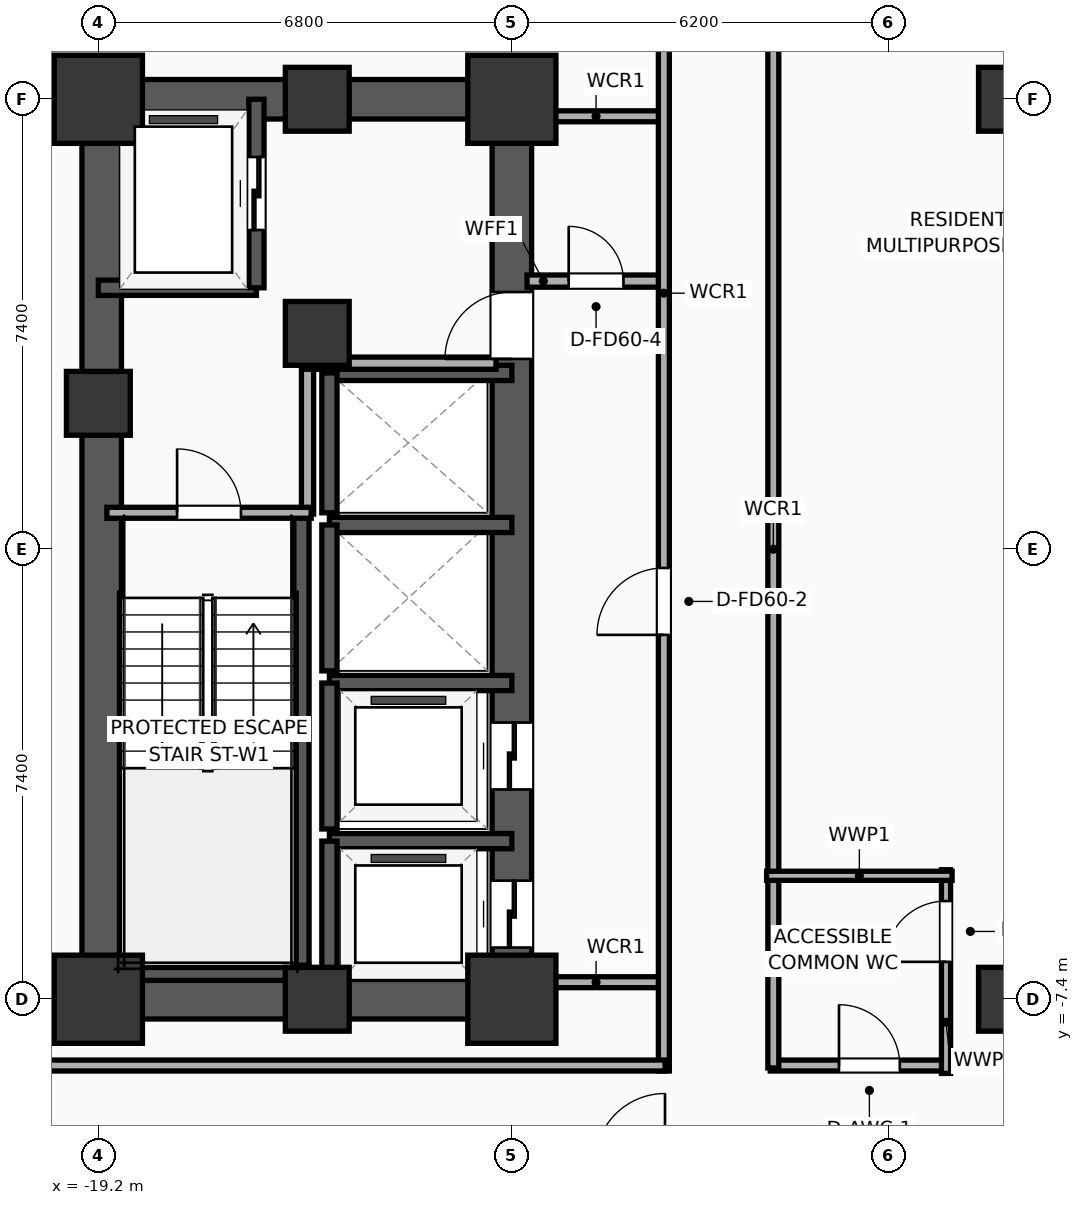
"""IFC4 building model, lengths in metres.
Left out: names, types, materials, properties, quantities, classifications, styles, units other than length and angle.
Written with IfcOpenShell. Run it as: python <this file> out.ifc"""

import sys

from ifc_helpers import new_model, si_unit, direction, frame, frame_2d, origin, origin_2d, place, context, subcontext, project, spatial, rectangle, extrude, element, fill, save


model = new_model("IFC4")
c1 = context("Model", 3, precision=1e-05, world=origin(), true_north=direction((0.0, 1.0)))
c2 = subcontext(c1, "Body", "Model", "MODEL_VIEW")
j1 = project(units=[si_unit("LENGTHUNIT", "METRE"), si_unit("PLANEANGLEUNIT", "RADIAN")], contexts=[c1])
p1 = place(None, origin())
s1 = spatial("IfcSite", under=j1, at=p1, CompositionType="ELEMENT")
p2 = place(p1, origin())
s2 = spatial("IfcBuilding", under=s1, at=p2, CompositionType="ELEMENT")
p3 = place(p2, frame((0.0, 0.0, 45.5)))
s3 = spatial("IfcBuildingStorey", under=s2, at=p3, CompositionType="ELEMENT", Elevation=45.5)
p4 = place(p3, frame((-19.2, -7.4, 0.0), z_axis=(0.0, 0.0, 1.0), x_axis=(1.0, 0.0, 0.0)))
e1 = element("IfcColumn", 1, at=p4, inside=s3, PredefinedType="COLUMN", context=c2, shape_type="SweptSolid", body=[
    extrude(rectangle(XDim=1.45, YDim=1.45, at=origin_2d()), origin(), (0.0, 0.0, 1.0), 3.9),
])
p5 = place(p3, frame((-19.2, 2.4, 0.0), z_axis=(0.0, 0.0, 1.0), x_axis=(1.0, 0.0, 0.0)))
e2 = element("IfcColumn", 2, at=p5, inside=s3, PredefinedType="COLUMN", context=c2, shape_type="SweptSolid", body=[
    extrude(rectangle(XDim=1.05, YDim=1.05, at=origin_2d()), origin(), (0.0, 0.0, 1.0), 3.9),
])
p6 = place(p3, frame((-19.2, 7.4, 0.0), z_axis=(0.0, 0.0, 1.0), x_axis=(1.0, 0.0, 0.0)))
e3 = element("IfcColumn", 3, at=p6, inside=s3, PredefinedType="COLUMN", context=c2, shape_type="SweptSolid", body=[
    extrude(rectangle(XDim=1.45, YDim=1.45, at=origin_2d()), origin(), (0.0, 0.0, 1.0), 3.9),
])
for number, where, z_axis, x_axis in (
    (4, (-15.6, -7.4, 0.0), (0.0, 0.0, 1.0), (1.0, 0.0, 0.0)),
    (5, (-15.6, 7.4, 0.0), (0.0, 0.0, 1.0), (1.0, 0.0, 0.0)),
):
    element("IfcColumn", number, at=place(p3, frame(where, z_axis=z_axis, x_axis=x_axis)), inside=s3, PredefinedType="COLUMN", context=c2, shape_type="SweptSolid", body=[
        extrude(rectangle(XDim=1.05, YDim=1.05, at=origin_2d()), origin(), (0.0, 0.0, 1.0), 3.9),
    ])
p7 = place(p3, frame((-12.4, -7.4, 0.0), z_axis=(0.0, 0.0, 1.0), x_axis=(1.0, 0.0, 0.0)))
e6 = element("IfcColumn", 6, at=p7, inside=s3, PredefinedType="COLUMN", context=c2, shape_type="SweptSolid", body=[
    extrude(rectangle(XDim=1.45, YDim=1.45, at=origin_2d()), origin(), (0.0, 0.0, 1.0), 3.9),
])
p8 = place(p3, frame((-15.6, 3.55, 0.0), z_axis=(0.0, 0.0, 1.0), x_axis=(1.0, 0.0, 0.0)))
e7 = element("IfcColumn", 7, at=p8, inside=s3, PredefinedType="COLUMN", context=c2, shape_type="SweptSolid", body=[
    extrude(rectangle(XDim=1.05, YDim=1.05, at=origin_2d()), origin(), (0.0, 0.0, 1.0), 3.9),
])
p9 = place(p3, frame((-12.4, 7.4, 0.0), z_axis=(0.0, 0.0, 1.0), x_axis=(1.0, 0.0, 0.0)))
e8 = element("IfcColumn", 8, at=p9, inside=s3, PredefinedType="COLUMN", context=c2, shape_type="SweptSolid", body=[
    extrude(rectangle(XDim=1.45, YDim=1.45, at=origin_2d()), origin(), (0.0, 0.0, 1.0), 3.9),
])
for number, where, z_axis, x_axis in (
    (9, (-19.525, -7.4, 0.0), (0.0, 0.0, 1.0), (1.0, 0.0, 0.0)),
    (10, (-19.525, 7.4, 0.0), (0.0, 0.0, 1.0), (1.0, 0.0, 0.0)),
):
    element("IfcWall", number, at=place(p3, frame(where, z_axis=z_axis, x_axis=x_axis)), inside=s3, PredefinedType="SHEAR", context=c2, shape_type="SweptSolid", body=[
        extrude(rectangle(XDim=7.45, YDim=0.65, at=frame_2d((3.725, 0.0))), origin(), (0.0, 0.0, 1.0), 3.65),
    ])
p10 = place(p3, frame((-19.145, -7.4, 0.0), z_axis=(0.0, 0.0, 1.0), x_axis=(0.0, 1.0, 0.0)))
e11 = element("IfcWall", 11, at=p10, inside=s3, PredefinedType="SHEAR", context=c2, shape_type="SweptSolid", body=[
    extrude(rectangle(XDim=14.8, YDim=0.65, at=frame_2d((7.4, 0.0))), origin(), (0.0, 0.0, 1.0), 3.65),
])
p11 = place(p3, frame((-12.4, -7.4, 0.0), z_axis=(0.0, 0.0, 1.0), x_axis=(0.0, 1.0, 0.0)))
e12 = element("IfcWall", 12, at=p11, inside=s3, PredefinedType="SHEAR", context=c2, shape_type="SweptSolid", body=[
    extrude(rectangle(XDim=14.8, YDim=0.65, at=frame_2d((7.4, 0.0))), origin(), (0.0, 0.0, 1.0), 3.65),
])
p12 = place(p11, frame((0.85, 0.0, 0.0)))
e13 = element("IfcOpeningElement", 13, at=p12, cuts=e12, PredefinedType="OPENING", context=c2, shape_type="SweptSolid", body=[
    extrude(rectangle(XDim=1.1, YDim=2.05, at=frame_2d((0.55, 1.025))), frame((0.0, 0.335, 0.0), z_axis=(0.0, -1.0, 0.0), x_axis=(1.0, 0.0, 0.0)), (0.0, 0.0, 1.0), 0.67),
])
p13 = place(p11, frame((3.45, 0.0, 0.0)))
e14 = element("IfcOpeningElement", 14, at=p13, cuts=e12, PredefinedType="OPENING", context=c2, shape_type="SweptSolid", body=[
    extrude(rectangle(XDim=1.1, YDim=2.05, at=frame_2d((0.55, 1.025))), frame((0.0, 0.335, 0.0), z_axis=(0.0, -1.0, 0.0), x_axis=(1.0, 0.0, 0.0)), (0.0, 0.0, 1.0), 0.67),
])
p14 = place(p11, frame((10.53, 0.0, 0.0)))
e15 = element("IfcOpeningElement", 15, at=p14, cuts=e12, PredefinedType="OPENING", context=c2, shape_type="SweptSolid", body=[
    extrude(rectangle(XDim=1.1, YDim=2.05, at=frame_2d((0.55, 1.025))), frame((0.0, 0.335, 0.0), z_axis=(0.0, -1.0, 0.0), x_axis=(1.0, 0.0, 0.0)), (0.0, 0.0, 1.0), 0.67),
])
p15 = place(p3, frame((-15.86, -7.085, 0.0), z_axis=(0.0, 0.0, 1.0), x_axis=(0.0, 1.0, 0.0)))
e16 = element("IfcWall", 16, at=p15, inside=s3, PredefinedType="SOLIDWALL", context=c2, shape_type="SweptSolid", body=[
    extrude(rectangle(XDim=7.685, YDim=0.25, at=frame_2d((3.843, 0.0))), origin(), (0.0, 0.0, 1.0), 3.65),
])
p16 = place(p3, frame((-19.2, -6.965, 0.0), z_axis=(0.0, 0.0, 1.0), x_axis=(1.0, 0.0, 0.0)))
e17 = element("IfcWall", 17, at=p16, inside=s3, PredefinedType="SOLIDWALL", context=c2, shape_type="SweptSolid", body=[
    extrude(rectangle(XDim=3.46, YDim=0.25, at=frame_2d((1.73, 0.0))), origin(), (0.0, 0.0, 1.0), 3.65),
])
for number, where, z_axis, x_axis in (
    (18, (-4.2, -7.4, 0.0), (0.0, 0.0, 1.0), (1.0, 0.0, 0.0)),
    (19, (-4.2, 7.4, 0.0), (0.0, 0.0, 1.0), (1.0, 0.0, 0.0)),
):
    element("IfcColumn", number, at=place(p3, frame(where, z_axis=z_axis, x_axis=x_axis)), inside=s3, PredefinedType="COLUMN", context=c2, shape_type="SweptSolid", body=[
        extrude(rectangle(XDim=1.05, YDim=1.05, at=origin_2d()), origin(), (0.0, 0.0, 1.0), 3.9),
    ])
p17 = place(p3, frame((-19.2, 4.3, 0.0), z_axis=(0.0, 0.0, 1.0), x_axis=(1.0, 0.0, 0.0)))
e20 = element("IfcWall", 20, at=p17, inside=s3, PredefinedType="SOLIDWALL", context=c2, shape_type="SweptSolid", body=[
    extrude(rectangle(XDim=2.6, YDim=0.25, at=frame_2d((1.3, 0.0))), origin(), (0.0, 0.0, 1.0), 3.65),
])
p18 = place(p3, frame((-16.6, 4.3, 0.0), z_axis=(0.0, 0.0, 1.0), x_axis=(0.0, 1.0, 0.0)))
e21 = element("IfcWall", 21, at=p18, inside=s3, PredefinedType="SOLIDWALL", context=c2, shape_type="SweptSolid", body=[
    extrude(rectangle(XDim=3.1, YDim=0.25, at=frame_2d((1.55, 0.0))), origin(), (0.0, 0.0, 1.0), 3.65),
])
p19 = place(p18, frame((0.95, 0.0, 0.0)))
e22 = element("IfcOpeningElement", 22, at=p19, cuts=e21, PredefinedType="OPENING", context=c2, shape_type="SweptSolid", body=[
    extrude(rectangle(XDim=1.2, YDim=2.05, at=frame_2d((0.6, 1.025))), frame((0.0, 0.135, 0.0), z_axis=(0.0, -1.0, 0.0), x_axis=(1.0, 0.0, 0.0)), (0.0, 0.0, 1.0), 0.27),
])
p20 = place(p3, frame((-12.4, -4.8, 0.0), z_axis=(0.0, 0.0, 1.0), x_axis=(-1.0, 0.0, 0.0)))
e23 = element("IfcWall", 23, at=p20, inside=s3, PredefinedType="SOLIDWALL", context=c2, shape_type="SweptSolid", body=[
    extrude(rectangle(XDim=3.0, YDim=0.25, at=frame_2d((1.5, 0.0))), origin(), (0.0, 0.0, 1.0), 3.65),
])
p21 = place(p3, frame((-15.4, -4.8, 0.0), z_axis=(0.0, 0.0, 1.0), x_axis=(0.0, -1.0, 0.0)))
e24 = element("IfcWall", 24, at=p21, inside=s3, PredefinedType="SOLIDWALL", context=c2, shape_type="SweptSolid", body=[
    extrude(rectangle(XDim=2.6, YDim=0.25, at=frame_2d((1.3, 0.0))), origin(), (0.0, 0.0, 1.0), 3.65),
])
p22 = place(p3, frame((-12.4, -2.2, 0.0), z_axis=(0.0, 0.0, 1.0), x_axis=(-1.0, 0.0, 0.0)))
e25 = element("IfcWall", 25, at=p22, inside=s3, PredefinedType="SOLIDWALL", context=c2, shape_type="SweptSolid", body=[
    extrude(rectangle(XDim=3.0, YDim=0.25, at=frame_2d((1.5, 0.0))), origin(), (0.0, 0.0, 1.0), 3.65),
])
p23 = place(p3, frame((-15.4, -2.2, 0.0), z_axis=(0.0, 0.0, 1.0), x_axis=(0.0, -1.0, 0.0)))
e26 = element("IfcWall", 26, at=p23, inside=s3, PredefinedType="SOLIDWALL", context=c2, shape_type="SweptSolid", body=[
    extrude(rectangle(XDim=2.4, YDim=0.25, at=frame_2d((1.2, 0.0))), origin(), (0.0, 0.0, 1.0), 3.65),
])
p24 = place(p3, frame((-12.4, 0.4, 0.0), z_axis=(0.0, 0.0, 1.0), x_axis=(-1.0, 0.0, 0.0)))
e27 = element("IfcWall", 27, at=p24, inside=s3, PredefinedType="SOLIDWALL", context=c2, shape_type="SweptSolid", body=[
    extrude(rectangle(XDim=3.0, YDim=0.25, at=frame_2d((1.5, 0.0))), origin(), (0.0, 0.0, 1.0), 3.65),
])
p25 = place(p3, frame((-15.4, 0.4, 0.0), z_axis=(0.0, 0.0, 1.0), x_axis=(0.0, -1.0, 0.0)))
e28 = element("IfcWall", 28, at=p25, inside=s3, PredefinedType="SOLIDWALL", context=c2, shape_type="SweptSolid", body=[
    extrude(rectangle(XDim=2.4, YDim=0.25, at=frame_2d((1.2, 0.0))), origin(), (0.0, 0.0, 1.0), 3.65),
])
p26 = place(p3, frame((-12.4, 2.9, 0.0), z_axis=(0.0, 0.0, 1.0), x_axis=(-1.0, 0.0, 0.0)))
e29 = element("IfcWall", 29, at=p26, inside=s3, PredefinedType="SOLIDWALL", context=c2, shape_type="SweptSolid", body=[
    extrude(rectangle(XDim=3.0, YDim=0.25, at=frame_2d((1.5, 0.0))), origin(), (0.0, 0.0, 1.0), 3.65),
])
p27 = place(p3, frame((-15.4, 2.9, 0.0), z_axis=(0.0, 0.0, 1.0), x_axis=(0.0, -1.0, 0.0)))
e30 = element("IfcWall", 30, at=p27, inside=s3, PredefinedType="SOLIDWALL", context=c2, shape_type="SweptSolid", body=[
    extrude(rectangle(XDim=2.3, YDim=0.25, at=frame_2d((1.15, 0.0))), origin(), (0.0, 0.0, 1.0), 3.65),
])
p28 = place(p3, frame((-15.76, 0.58, 0.0), z_axis=(0.0, 0.0, 1.0), x_axis=(0.0, 1.0, 0.0)))
e31 = element("IfcWall", 31, at=p28, inside=s3, PredefinedType="PARTITIONING", context=c2, shape_type="SweptSolid", body=[
    extrude(rectangle(XDim=2.52, YDim=0.2, at=frame_2d((1.26, 0.0))), origin(), (0.0, 0.0, 1.0), 3.65),
])
p29 = place(p3, frame((-15.82, 3.06, 0.0), z_axis=(0.0, 0.0, 1.0), x_axis=(1.0, 0.0, 0.0)))
e32 = element("IfcWall", 32, at=p29, inside=s3, PredefinedType="PARTITIONING", context=c2, shape_type="SweptSolid", body=[
    extrude(rectangle(XDim=3.16, YDim=0.2, at=frame_2d((1.58, 0.0))), origin(), (0.0, 0.0, 1.0), 3.65),
])
p30 = place(p3, frame((-19.06, 0.6, 0.0), z_axis=(0.0, 0.0, 1.0), x_axis=(1.0, 0.0, 0.0)))
e33 = element("IfcWall", 33, at=p30, inside=s3, PredefinedType="PARTITIONING", context=c2, shape_type="SweptSolid", body=[
    extrude(rectangle(XDim=3.36, YDim=0.18, at=frame_2d((1.68, 0.0))), origin(), (0.0, 0.0, 1.0), 3.65),
])
p31 = place(p30, frame((1.155, 0.0, 0.0)))
e34 = element("IfcOpeningElement", 34, at=p31, cuts=e33, PredefinedType="OPENING", context=c2, shape_type="SweptSolid", body=[
    extrude(rectangle(XDim=1.05, YDim=2.05, at=frame_2d((0.525, 1.025))), frame((0.0, 0.1, 0.0), z_axis=(0.0, -1.0, 0.0), x_axis=(1.0, 0.0, 0.0)), (0.0, 0.0, 1.0), 0.2),
])
p32 = place(p3, frame((-12.15, 4.41, 0.0), z_axis=(0.0, 0.0, 1.0), x_axis=(1.0, 0.0, 0.0)))
e35 = element("IfcWall", 35, at=p32, inside=s3, PredefinedType="PARTITIONING", context=c2, shape_type="SweptSolid", body=[
    extrude(rectangle(XDim=2.27, YDim=0.2, at=frame_2d((1.135, 0.0))), origin(), (0.0, 0.0, 1.0), 3.65),
])
p33 = place(p32, frame((0.685, 0.0, 0.0)))
e36 = element("IfcOpeningElement", 36, at=p33, cuts=e35, PredefinedType="OPENING", context=c2, shape_type="SweptSolid", body=[
    extrude(rectangle(XDim=0.9, YDim=2.05, at=frame_2d((0.45, 1.025))), frame((0.0, 0.11, 0.0), z_axis=(0.0, -1.0, 0.0), x_axis=(1.0, 0.0, 0.0)), (0.0, 0.0, 1.0), 0.22),
])
for number, where, z_axis, x_axis in (
    (37, (-12.15, 7.12, 0.0), (0.0, 0.0, 1.0), (1.0, 0.0, 0.0)),
    (38, (-12.15, -7.12, 0.0), (0.0, 0.0, 1.0), (1.0, 0.0, 0.0)),
):
    element("IfcWall", number, at=place(p3, frame(where, z_axis=z_axis, x_axis=x_axis)), inside=s3, PredefinedType="PARTITIONING", context=c2, shape_type="SweptSolid", body=[
        extrude(rectangle(XDim=2.27, YDim=0.18, at=frame_2d((1.135, 0.0))), origin(), (0.0, 0.0, 1.0), 2.94),
    ])
p34 = place(p3, frame((-9.9, -8.58, 0.0), z_axis=(0.0, 0.0, 1.0), x_axis=(0.0, 1.0, 0.0)))
e39 = element("IfcWall", 39, at=p34, inside=s3, PredefinedType="PARTITIONING", context=c2, shape_type="SweptSolid", body=[
    extrude(rectangle(XDim=17.16, YDim=0.18, at=frame_2d((8.58, 0.0))), origin(), (0.0, 0.0, 1.0), 3.65),
])
p35 = place(p34, frame((7.172, 0.0, 0.0)))
e40 = element("IfcOpeningElement", 40, at=p35, cuts=e39, PredefinedType="OPENING", context=c2, shape_type="SweptSolid", body=[
    extrude(rectangle(XDim=1.1, YDim=2.05, at=frame_2d((0.55, 1.025))), frame((0.0, 0.1, 0.0), z_axis=(0.0, -1.0, 0.0), x_axis=(1.0, 0.0, 0.0)), (0.0, 0.0, 1.0), 0.2),
])
p36 = place(p3, frame((-33.41, -8.49, 0.0), z_axis=(0.0, 0.0, 1.0), x_axis=(1.0, 0.0, 0.0)))
e41 = element("IfcWall", 41, at=p36, inside=s3, PredefinedType="PARTITIONING", context=c2, shape_type="SweptSolid", body=[
    extrude(rectangle(XDim=23.53, YDim=0.18, at=frame_2d((11.765, 0.0))), origin(), (0.0, 0.0, 1.0), 3.65),
])
p37 = place(p3, frame((-8.15, -8.49, 0.0), z_axis=(0.0, 0.0, 1.0), x_axis=(1.0, 0.0, 0.0)))
e42 = element("IfcWall", 42, at=p37, inside=s3, PredefinedType="PARTITIONING", context=c2, shape_type="SweptSolid", body=[
    extrude(rectangle(XDim=16.3, YDim=0.18, at=frame_2d((8.15, 0.0))), origin(), (0.0, 0.0, 1.0), 3.65),
])
p38 = place(p37, frame((1.13, 0.0, 0.0)))
e43 = element("IfcOpeningElement", 43, at=p38, cuts=e42, PredefinedType="OPENING", context=c2, shape_type="SweptSolid", body=[
    extrude(rectangle(XDim=1.0, YDim=2.05, at=frame_2d((0.5, 1.025))), frame((0.0, 0.1, 0.0), z_axis=(0.0, -1.0, 0.0), x_axis=(1.0, 0.0, 0.0)), (0.0, 0.0, 1.0), 0.2),
])
p39 = place(p37, frame((10.12, 0.0, 0.0)))
e44 = element("IfcOpeningElement", 44, at=p39, cuts=e42, PredefinedType="OPENING", context=c2, shape_type="SweptSolid", body=[
    extrude(rectangle(XDim=0.95, YDim=2.05, at=frame_2d((0.475, 1.025))), frame((0.0, 0.1, 0.0), z_axis=(0.0, -1.0, 0.0), x_axis=(1.0, 0.0, 0.0)), (0.0, 0.0, 1.0), 0.2),
])
p40 = place(p3, frame((-8.1, -8.53, 0.0), z_axis=(0.0, 0.0, 1.0), x_axis=(0.0, 1.0, 0.0)))
e45 = element("IfcWall", 45, at=p40, inside=s3, PredefinedType="PARTITIONING", context=c2, shape_type="SweptSolid", body=[
    extrude(rectangle(XDim=17.06, YDim=0.18, at=frame_2d((8.53, 0.0))), origin(), (0.0, 0.0, 1.0), 3.65),
])
p41 = place(p3, frame((-5.26, -8.62, 0.0), z_axis=(0.0, 0.0, 1.0), x_axis=(0.0, 1.0, 0.0)))
e46 = element("IfcWall", 46, at=p41, inside=s3, PredefinedType="PLUMBINGWALL", context=c2, shape_type="SweptSolid", body=[
    extrude(rectangle(XDim=3.35, YDim=0.15, at=frame_2d((1.675, 0.0))), origin(), (0.0, 0.0, 1.0), 3.65),
])
p42 = place(p41, frame((1.835, 0.0, 0.0)))
e47 = element("IfcOpeningElement", 47, at=p42, cuts=e46, PredefinedType="OPENING", context=c2, shape_type="SweptSolid", body=[
    extrude(rectangle(XDim=1.0, YDim=2.05, at=frame_2d((0.5, 1.025))), frame((0.0, 0.085, 0.0), z_axis=(0.0, -1.0, 0.0), x_axis=(1.0, 0.0, 0.0)), (0.0, 0.0, 1.0), 0.17),
])
p43 = place(p3, frame((-8.21, -5.37, 0.0), z_axis=(0.0, 0.0, 1.0), x_axis=(1.0, 0.0, 0.0)))
e48 = element("IfcWall", 48, at=p43, inside=s3, PredefinedType="PLUMBINGWALL", context=c2, shape_type="SweptSolid", body=[
    extrude(rectangle(XDim=3.05, YDim=0.15, at=frame_2d((1.525, 0.0))), origin(), (0.0, 0.0, 1.0), 3.65),
])
p44 = place(p19, origin())
e49 = element("IfcDoor", 49, at=p44, inside=s3, OperationType="SLIDING_TO_LEFT", PredefinedType="DOOR", context=c2, shape_type="SweptSolid", body=[
    extrude(rectangle(XDim=1.2, YDim=2.05, at=frame_2d((0.6, 1.025))), frame((0.0, 0.025, 0.0), z_axis=(0.0, -1.0, 0.0), x_axis=(1.0, 0.0, 0.0)), (0.0, 0.0, 1.0), 0.05),
])
fill(e22, e49)
p45 = place(p12, origin())
e50 = element("IfcDoor", 50, at=p45, inside=s3, OperationType="SLIDING_TO_LEFT", PredefinedType="DOOR", context=c2, shape_type="SweptSolid", body=[
    extrude(rectangle(XDim=1.1, YDim=2.05, at=frame_2d((0.55, 1.025))), frame((0.0, 0.025, 0.0), z_axis=(0.0, -1.0, 0.0), x_axis=(1.0, 0.0, 0.0)), (0.0, 0.0, 1.0), 0.05),
])
fill(e13, e50)
p46 = place(p13, origin())
e51 = element("IfcDoor", 51, at=p46, inside=s3, OperationType="SLIDING_TO_LEFT", PredefinedType="DOOR", context=c2, shape_type="SweptSolid", body=[
    extrude(rectangle(XDim=1.1, YDim=2.05, at=frame_2d((0.55, 1.025))), frame((0.0, 0.025, 0.0), z_axis=(0.0, -1.0, 0.0), x_axis=(1.0, 0.0, 0.0)), (0.0, 0.0, 1.0), 0.05),
])
fill(e14, e51)
p47 = place(p31, origin())
e52 = element("IfcDoor", 52, at=p47, inside=s3, OperationType="SINGLE_SWING_LEFT", PredefinedType="DOOR", context=c2, shape_type="SweptSolid", body=[
    extrude(rectangle(XDim=1.05, YDim=2.05, at=frame_2d((0.525, 1.025))), frame((0.0, 0.025, 0.0), z_axis=(0.0, -1.0, 0.0), x_axis=(1.0, 0.0, 0.0)), (0.0, 0.0, 1.0), 0.05),
])
fill(e34, e52)
p48 = place(p33, origin())
e53 = element("IfcDoor", 53, at=p48, inside=s3, OperationType="SINGLE_SWING_LEFT", PredefinedType="DOOR", context=c2, shape_type="SweptSolid", body=[
    extrude(rectangle(XDim=0.9, YDim=2.05, at=frame_2d((0.45, 1.025))), frame((0.0, 0.025, 0.0), z_axis=(0.0, -1.0, 0.0), x_axis=(1.0, 0.0, 0.0)), (0.0, 0.0, 1.0), 0.05),
])
fill(e36, e53)
p49 = place(p35, origin())
e54 = element("IfcDoor", 54, at=p49, inside=s3, OperationType="SINGLE_SWING_LEFT", PredefinedType="DOOR", context=c2, shape_type="SweptSolid", body=[
    extrude(rectangle(XDim=1.1, YDim=2.05, at=frame_2d((0.55, 1.025))), frame((0.0, 0.025, 0.0), z_axis=(0.0, -1.0, 0.0), x_axis=(1.0, 0.0, 0.0)), (0.0, 0.0, 1.0), 0.05),
])
fill(e40, e54)
p50 = place(p38, origin())
e55 = element("IfcDoor", 55, at=p50, inside=s3, OperationType="SINGLE_SWING_LEFT", PredefinedType="DOOR", context=c2, shape_type="SweptSolid", body=[
    extrude(rectangle(XDim=1.0, YDim=2.05, at=frame_2d((0.5, 1.025))), frame((0.0, 0.025, 0.0), z_axis=(0.0, -1.0, 0.0), x_axis=(1.0, 0.0, 0.0)), (0.0, 0.0, 1.0), 0.05),
])
fill(e43, e55)
p51 = place(p42, origin())
e56 = element("IfcDoor", 56, at=p51, inside=s3, OperationType="SINGLE_SWING_LEFT", PredefinedType="DOOR", context=c2, shape_type="SweptSolid", body=[
    extrude(rectangle(XDim=1.0, YDim=2.05, at=frame_2d((0.5, 1.025))), frame((0.0, 0.025, 0.0), z_axis=(0.0, -1.0, 0.0), x_axis=(1.0, 0.0, 0.0)), (0.0, 0.0, 1.0), 0.05),
])
fill(e47, e56)
p52 = place(p14, origin())
e57 = element("IfcDoor", 57, at=p52, inside=s3, OperationType="SINGLE_SWING_LEFT", PredefinedType="DOOR", context=c2, shape_type="SweptSolid", body=[
    extrude(rectangle(XDim=1.1, YDim=2.05, at=frame_2d((0.55, 1.025))), frame((0.0, 0.025, 0.0), z_axis=(0.0, -1.0, 0.0), x_axis=(1.0, 0.0, 0.0)), (0.0, 0.0, 1.0), 0.05),
])
fill(e15, e57)
save(model, sys.argv[1])
